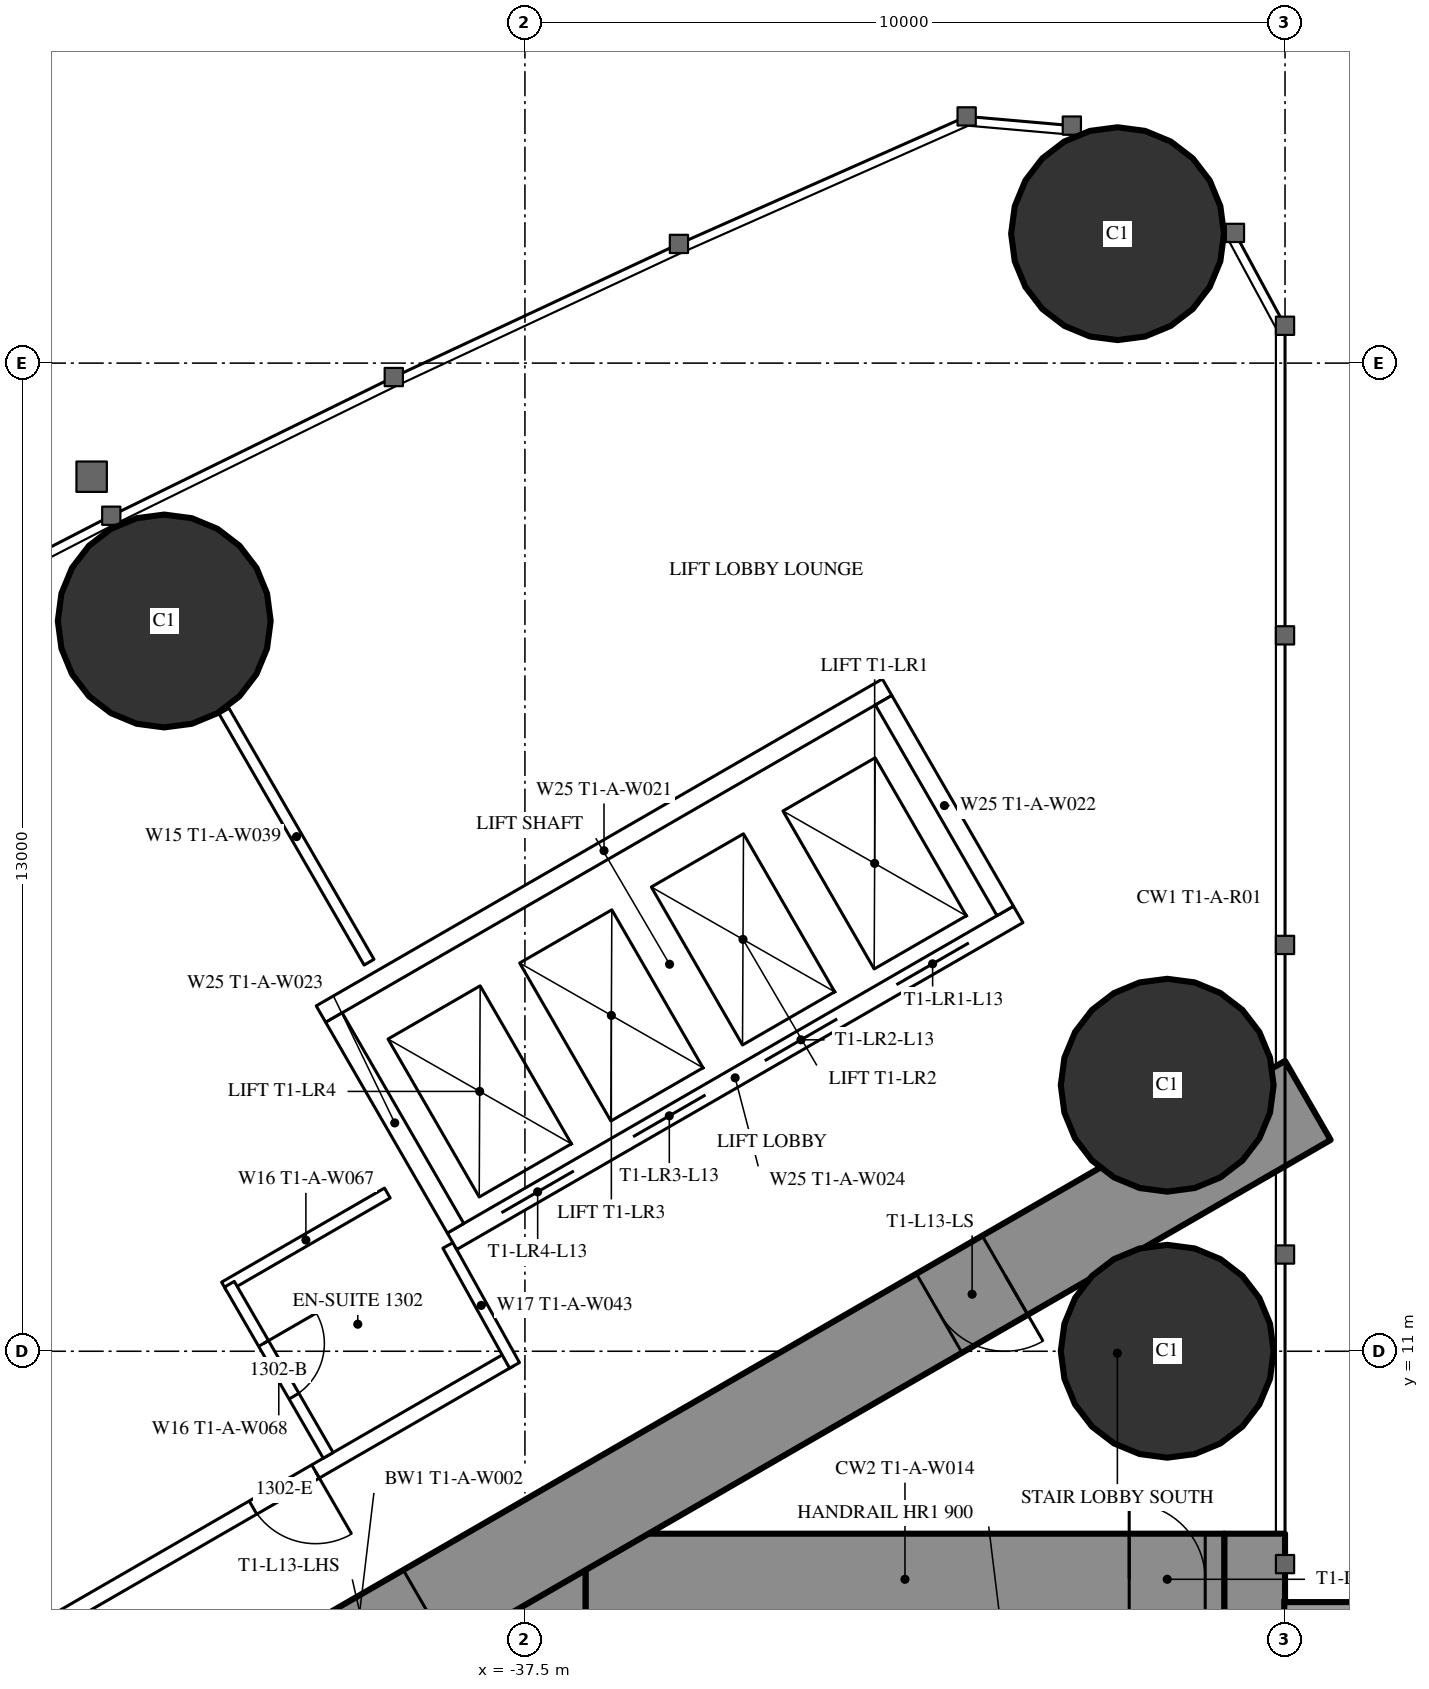
"""IFC4 building model, lengths in metres.
Left out: names, types, materials, properties, quantities, classifications, styles, units other than length and angle.
Written with IfcOpenShell. Run it as: python <this file> out.ifc"""

import sys

from ifc_helpers import new_model, si_unit, direction, frame, frame_2d, origin, origin_2d, place, context, subcontext, project, spatial, rectangle, hollow_circle, extrude, element, fill, save


model = new_model("IFC4")
c1 = context("Model", 3, precision=1e-05, world=origin(), true_north=direction((0.0, 1.0)))
c2 = subcontext(c1, "Body", "Model", "MODEL_VIEW")
j1 = project(units=[si_unit("LENGTHUNIT", "METRE"), si_unit("PLANEANGLEUNIT", "RADIAN")], contexts=[c1])
p1 = place(None, origin())
s1 = spatial("IfcSite", under=j1, at=p1, CompositionType="ELEMENT")
p2 = place(p1, origin())
s2 = spatial("IfcBuilding", under=s1, at=p2, CompositionType="ELEMENT")
p3 = place(p2, frame((0.0, 0.0, 53.0)))
s3 = spatial("IfcBuildingStorey", under=s2, at=p3, CompositionType="ELEMENT", Elevation=53.0)
for number, where, z_axis, x_axis in (
    (1, (-29.703, 25.703, 0.0), (0.0, 0.0, 1.0), (1.0, 0.0, 0.0)),
    (2, (-29.05, 11.0, 0.0), (0.0, 0.0, 1.0), (1.0, 0.0, 0.0)),
    (3, (-29.05, 14.5, 0.0), (0.0, 0.0, 1.0), (1.0, 0.0, 0.0)),
    (4, (-42.245, 20.607, 0.0), (0.0, 0.0, 1.0), (1.0, 0.0, 0.0)),
):
    element("IfcColumn", number, at=place(p3, frame(where, z_axis=z_axis, x_axis=x_axis)), inside=s3, PredefinedType="COLUMN", context=c2, shape_type="SweptSolid", body=[
        extrude(hollow_circle(Radius=1.4, WallThickness=0.12, at=origin_2d()), origin(), (0.0, 0.0, 1.0), 3.5),
    ])
p4 = place(p3, frame((-27.9, 8.6, 0.0), z_axis=(0.0, 0.0, 1.0), x_axis=(0.0, -1.0, 0.0)))
e5 = element("IfcWall", 5, at=p4, inside=s3, PredefinedType="SHEAR", context=c2, shape_type="SweptSolid", body=[
    extrude(rectangle(XDim=17.2, YDim=0.8, at=frame_2d((8.6, 0.0))), origin(), (0.0, 0.0, 1.0), 3.5),
])
p5 = place(p4, frame((2.45, 0.0, 0.6)))
e6 = element("IfcOpeningElement", 6, at=p5, cuts=e5, PredefinedType="OPENING", context=c2, shape_type="SweptSolid", body=[
    extrude(rectangle(XDim=0.6, YDim=2.1, at=frame_2d((0.3, 1.05))), frame((0.0, 0.41, 0.0), z_axis=(0.0, -1.0, 0.0), x_axis=(1.0, 0.0, 0.0)), (0.0, 0.0, 1.0), 0.82),
])
p6 = place(p4, frame((14.15, 0.0, 0.6)))
e7 = element("IfcOpeningElement", 7, at=p6, cuts=e5, PredefinedType="OPENING", context=c2, shape_type="SweptSolid", body=[
    extrude(rectangle(XDim=0.6, YDim=2.1, at=frame_2d((0.3, 1.05))), frame((0.0, 0.41, 0.0), z_axis=(0.0, -1.0, 0.0), x_axis=(1.0, 0.0, 0.0)), (0.0, 0.0, 1.0), 0.82),
])
p7 = place(p3, frame((-37.3, 8.6, 0.0), z_axis=(0.0, 0.0, 1.0), x_axis=(0.0, -1.0, 0.0)))
e8 = element("IfcWall", 8, at=p7, inside=s3, PredefinedType="SHEAR", context=c2, shape_type="SweptSolid", body=[
    extrude(rectangle(XDim=17.2, YDim=1.2, at=frame_2d((8.6, 0.0))), origin(), (0.0, 0.0, 1.0), 3.5),
])
p8 = place(p7, frame((7.7, 0.0, 0.0)))
e9 = element("IfcOpeningElement", 9, at=p8, cuts=e8, PredefinedType="OPENING", context=c2, shape_type="SweptSolid", body=[
    extrude(rectangle(XDim=1.8, YDim=2.2, at=frame_2d((0.9, 1.1))), frame((0.0, 0.61, 0.0), z_axis=(0.0, -1.0, 0.0), x_axis=(1.0, 0.0, 0.0)), (0.0, 0.0, 1.0), 1.22),
])
p9 = place(p3, frame((-28.3, 8.0, 0.0), z_axis=(0.0, 0.0, 1.0), x_axis=(-1.0, 0.0, 0.0)))
e10 = element("IfcWall", 10, at=p9, inside=s3, PredefinedType="SHEAR", context=c2, shape_type="SweptSolid", body=[
    extrude(rectangle(XDim=8.4, YDim=1.2, at=frame_2d((4.2, 0.0))), origin(), (0.0, 0.0, 1.0), 3.5),
])
p10 = place(p9, frame((0.25, 0.0, 0.0)))
e11 = element("IfcOpeningElement", 11, at=p10, cuts=e10, PredefinedType="OPENING", context=c2, shape_type="SweptSolid", body=[
    extrude(rectangle(XDim=1.0, YDim=2.2, at=frame_2d((0.5, 1.1))), frame((0.0, 0.61, 0.0), z_axis=(0.0, -1.0, 0.0), x_axis=(1.0, 0.0, 0.0)), (0.0, 0.0, 1.0), 1.22),
])
p11 = place(p3, frame((-27.2, 14.3, 0.0), z_axis=(0.0, 0.0, 1.0), x_axis=(-0.866026593062, -0.499997940104, 0.0)))
e12 = element("IfcWall", 12, at=p11, inside=s3, PredefinedType="SHEAR", context=c2, shape_type="SweptSolid", body=[
    extrude(rectangle(XDim=28.946, YDim=1.2, at=frame_2d((14.473, 0.0))), origin(), (0.0, 0.0, 1.0), 3.5),
])
p12 = place(p11, frame((4.6, 0.0, 0.0)))
e13 = element("IfcOpeningElement", 13, at=p12, cuts=e12, PredefinedType="OPENING", context=c2, shape_type="SweptSolid", body=[
    extrude(rectangle(XDim=1.0, YDim=2.2, at=frame_2d((0.5, 1.1))), frame((0.0, 0.61, 0.0), z_axis=(0.0, -1.0, 0.0), x_axis=(1.0, 0.0, 0.0)), (0.0, 0.0, 1.0), 1.22),
])
p13 = place(p11, frame((13.395, 0.0, 0.0)))
e14 = element("IfcOpeningElement", 14, at=p13, cuts=e12, PredefinedType="OPENING", context=c2, shape_type="SweptSolid", body=[
    extrude(rectangle(XDim=1.8, YDim=2.2, at=frame_2d((0.9, 1.1))), frame((0.0, 0.61, 0.0), z_axis=(0.0, -1.0, 0.0), x_axis=(1.0, 0.0, 0.0)), (0.0, 0.0, 1.0), 1.22),
])
p14 = place(p3, frame((-39.551, 16.119, 0.0), z_axis=(0.0, 0.0, 1.0), x_axis=(-0.500014214979, 0.866017196607, 0.0)))
e15 = element("IfcWall", 15, at=p14, inside=s3, PredefinedType="PARTITIONING", context=c2, shape_type="SweptSolid", body=[
    extrude(rectangle(XDim=3.815, YDim=0.15, at=frame_2d((1.907, 0.0))), origin(), (0.0, 0.0, 1.0), 3.25),
])
p15 = place(p3, frame((-37.7, 10.894, 0.0), z_axis=(0.0, 0.0, 1.0), x_axis=(-0.866027905338, -0.499995667157, 0.0)))
e16 = element("IfcWall", 16, at=p15, inside=s3, PredefinedType="PARTITIONING", context=c2, shape_type="SweptSolid", body=[
    extrude(rectangle(XDim=21.787, YDim=0.2, at=frame_2d((10.894, 0.0))), origin(), (0.0, 0.0, 1.0), 3.25),
])
p16 = place(p15, frame((20.237, 0.0, 0.0)))
e17 = element("IfcOpeningElement", 17, at=p16, cuts=e16, PredefinedType="OPENING", context=c2, shape_type="SweptSolid", body=[
    extrude(rectangle(XDim=0.95, YDim=2.2, at=frame_2d((0.475, 1.1))), frame((0.0, 0.11, 0.0), z_axis=(0.0, -1.0, 0.0), x_axis=(1.0, 0.0, 0.0)), (0.0, 0.0, 1.0), 0.22),
])
p17 = place(p15, frame((2.95, 0.0, 0.0)))
e18 = element("IfcOpeningElement", 18, at=p17, cuts=e16, PredefinedType="OPENING", context=c2, shape_type="SweptSolid", body=[
    extrude(rectangle(XDim=0.95, YDim=2.2, at=frame_2d((0.475, 1.1))), frame((0.0, 0.11, 0.0), z_axis=(0.0, -1.0, 0.0), x_axis=(1.0, 0.0, 0.0)), (0.0, 0.0, 1.0), 0.22),
])
p18 = place(p3, frame((-38.513, 12.392, 0.0), z_axis=(0.0, 0.0, 1.0), x_axis=(0.485585508183, -0.874189175317, 0.0)))
e19 = element("IfcWall", 19, at=p18, inside=s3, PredefinedType="PARTITIONING", context=c2, shape_type="SweptSolid", body=[
    extrude(rectangle(XDim=1.805, YDim=0.15, at=frame_2d((0.902, 0.0))), origin(), (0.0, 0.0, 1.0), 3.25),
])
p19 = place(p3, frame((-39.31, 13.082, 0.0), z_axis=(0.0, 0.0, 1.0), x_axis=(-0.866031185235, -0.4999899861, 0.0)))
e20 = element("IfcWall", 20, at=p19, inside=s3, PredefinedType="PARTITIONING", context=c2, shape_type="SweptSolid", body=[
    extrude(rectangle(XDim=2.475, YDim=0.15, at=frame_2d((1.238, 0.0))), origin(), (0.0, 0.0, 1.0), 3.25),
])
p20 = place(p3, frame((-40.088, 9.63, 0.0), z_axis=(0.0, 0.0, 1.0), x_axis=(-0.500006934395, 0.866021400173, 0.0)))
e21 = element("IfcWall", 21, at=p20, inside=s3, PredefinedType="PARTITIONING", context=c2, shape_type="SweptSolid", body=[
    extrude(rectangle(XDim=2.6, YDim=0.15, at=frame_2d((1.3, 0.0))), origin(), (0.0, 0.0, 1.0), 3.25),
])
p21 = place(p20, frame((0.9, 0.0, 0.0)))
e22 = element("IfcOpeningElement", 22, at=p21, cuts=e21, PredefinedType="OPENING", context=c2, shape_type="SweptSolid", body=[
    extrude(rectangle(XDim=0.8, YDim=2.2, at=frame_2d((0.4, 1.1))), frame((0.0, 0.085, 0.0), z_axis=(0.0, -1.0, 0.0), x_axis=(1.0, 0.0, 0.0)), (0.0, 0.0, 1.0), 0.17),
])
p22 = place(p3, frame((-31.01, 16.747, 0.0), z_axis=(0.0, 0.0, 1.0), x_axis=(-0.866028165386, -0.499995216735, 0.0)))
e23 = element("IfcWall", 23, at=p22, inside=s3, PredefinedType="PARTITIONING", context=c2, shape_type="SweptSolid", body=[
    extrude(rectangle(XDim=8.6, YDim=0.25, at=frame_2d((4.3, 0.0))), origin(), (0.0, 0.0, 1.0), 3.25),
])
p23 = place(p22, frame((0.75, 0.0, 0.0)))
e24 = element("IfcOpeningElement", 24, at=p23, cuts=e23, PredefinedType="OPENING", context=c2, shape_type="SweptSolid", body=[
    extrude(rectangle(XDim=1.1, YDim=2.2, at=frame_2d((0.55, 1.1))), frame((0.0, 0.135, 0.0), z_axis=(0.0, -1.0, 0.0), x_axis=(1.0, 0.0, 0.0)), (0.0, 0.0, 1.0), 0.27),
])
p24 = place(p22, frame((2.75, 0.0, 0.0)))
e25 = element("IfcOpeningElement", 25, at=p24, cuts=e23, PredefinedType="OPENING", context=c2, shape_type="SweptSolid", body=[
    extrude(rectangle(XDim=1.1, YDim=2.2, at=frame_2d((0.55, 1.1))), frame((0.0, 0.135, 0.0), z_axis=(0.0, -1.0, 0.0), x_axis=(1.0, 0.0, 0.0)), (0.0, 0.0, 1.0), 0.27),
])
p25 = place(p22, frame((4.75, 0.0, 0.0)))
e26 = element("IfcOpeningElement", 26, at=p25, cuts=e23, PredefinedType="OPENING", context=c2, shape_type="SweptSolid", body=[
    extrude(rectangle(XDim=1.1, YDim=2.2, at=frame_2d((0.55, 1.1))), frame((0.0, 0.135, 0.0), z_axis=(0.0, -1.0, 0.0), x_axis=(1.0, 0.0, 0.0)), (0.0, 0.0, 1.0), 0.27),
])
p26 = place(p22, frame((6.75, 0.0, 0.0)))
e27 = element("IfcOpeningElement", 27, at=p26, cuts=e23, PredefinedType="OPENING", context=c2, shape_type="SweptSolid", body=[
    extrude(rectangle(XDim=1.1, YDim=2.2, at=frame_2d((0.55, 1.1))), frame((0.0, 0.135, 0.0), z_axis=(0.0, -1.0, 0.0), x_axis=(1.0, 0.0, 0.0)), (0.0, 0.0, 1.0), 0.27),
])
p27 = place(p3, frame((-32.736, 19.736, 0.0), z_axis=(0.0, 0.0, 1.0), x_axis=(-0.866028165386, -0.499995216735, 0.0)))
e28 = element("IfcWall", 28, at=p27, inside=s3, PredefinedType="PARTITIONING", context=c2, shape_type="SweptSolid", body=[
    extrude(rectangle(XDim=8.6, YDim=0.25, at=frame_2d((4.3, 0.0))), origin(), (0.0, 0.0, 1.0), 3.25),
])
p28 = place(p3, frame((-31.181, 16.793, 0.0), z_axis=(0.0, 0.0, 1.0), x_axis=(-0.499929347863, 0.866066190972, 0.0)))
e29 = element("IfcWall", 29, at=p28, inside=s3, PredefinedType="PARTITIONING", context=c2, shape_type="SweptSolid", body=[
    extrude(rectangle(XDim=3.201, YDim=0.25, at=frame_2d((1.6, 0.0))), origin(), (0.0, 0.0, 1.0), 3.25),
])
p29 = place(p3, frame((-38.413, 12.618, 0.0), z_axis=(0.0, 0.0, 1.0), x_axis=(-0.499872130319, 0.866099216793, 0.0)))
e30 = element("IfcWall", 30, at=p29, inside=s3, PredefinedType="PARTITIONING", context=c2, shape_type="SweptSolid", body=[
    extrude(rectangle(XDim=3.2, YDim=0.25, at=frame_2d((1.6, 0.0))), origin(), (0.0, 0.0, 1.0), 3.25),
])
p30 = place(p21, origin())
e31 = element("IfcDoor", 31, at=p30, inside=s3, OperationType="SINGLE_SWING_RIGHT", PredefinedType="DOOR", context=c2, shape_type="SweptSolid", body=[
    extrude(rectangle(XDim=0.8, YDim=2.2, at=frame_2d((0.4, 1.1))), frame((0.0, 0.025, 0.0), z_axis=(0.0, -1.0, 0.0), x_axis=(1.0, 0.0, 0.0)), (0.0, 0.0, 1.0), 0.05),
])
fill(e22, e31)
p31 = place(p17, origin())
e32 = element("IfcDoor", 32, at=p31, inside=s3, OperationType="SINGLE_SWING_LEFT", PredefinedType="DOOR", context=c2, shape_type="SweptSolid", body=[
    extrude(rectangle(XDim=0.95, YDim=2.2, at=frame_2d((0.475, 1.1))), frame((0.0, 0.025, 0.0), z_axis=(0.0, -1.0, 0.0), x_axis=(1.0, 0.0, 0.0)), (0.0, 0.0, 1.0), 0.05),
])
fill(e18, e32)
p32 = place(p12, origin())
e33 = element("IfcDoor", 33, at=p32, inside=s3, OperationType="SINGLE_SWING_LEFT", PredefinedType="DOOR", context=c2, shape_type="SweptSolid", body=[
    extrude(rectangle(XDim=1.0, YDim=2.2, at=frame_2d((0.5, 1.1))), frame((0.0, 0.025, 0.0), z_axis=(0.0, -1.0, 0.0), x_axis=(1.0, 0.0, 0.0)), (0.0, 0.0, 1.0), 0.05),
])
fill(e13, e33)
p33 = place(p13, origin())
e34 = element("IfcDoor", 34, at=p33, inside=s3, OperationType="DOUBLE_DOOR_SINGLE_SWING", PredefinedType="DOOR", context=c2, shape_type="SweptSolid", body=[
    extrude(rectangle(XDim=1.8, YDim=2.2, at=frame_2d((0.9, 1.1))), frame((0.0, 0.025, 0.0), z_axis=(0.0, -1.0, 0.0), x_axis=(1.0, 0.0, 0.0)), (0.0, 0.0, 1.0), 0.05),
])
fill(e14, e34)
p34 = place(p10, origin())
e35 = element("IfcDoor", 35, at=p34, inside=s3, OperationType="SINGLE_SWING_RIGHT", PredefinedType="DOOR", context=c2, shape_type="SweptSolid", body=[
    extrude(rectangle(XDim=1.0, YDim=2.2, at=frame_2d((0.5, 1.1))), frame((0.0, 0.025, 0.0), z_axis=(0.0, -1.0, 0.0), x_axis=(1.0, 0.0, 0.0)), (0.0, 0.0, 1.0), 0.05),
])
fill(e11, e35)
p35 = place(p23, origin())
e36 = element("IfcDoor", 36, at=p35, inside=s3, OperationType="DOUBLE_DOOR_SLIDING", PredefinedType="USERDEFINED", context=c2, shape_type="SweptSolid", body=[
    extrude(rectangle(XDim=1.1, YDim=2.2, at=frame_2d((0.55, 1.1))), frame((0.0, 0.025, 0.0), z_axis=(0.0, -1.0, 0.0), x_axis=(1.0, 0.0, 0.0)), (0.0, 0.0, 1.0), 0.05),
])
fill(e24, e36)
p36 = place(p24, origin())
e37 = element("IfcDoor", 37, at=p36, inside=s3, OperationType="DOUBLE_DOOR_SLIDING", PredefinedType="USERDEFINED", context=c2, shape_type="SweptSolid", body=[
    extrude(rectangle(XDim=1.1, YDim=2.2, at=frame_2d((0.55, 1.1))), frame((0.0, 0.025, 0.0), z_axis=(0.0, -1.0, 0.0), x_axis=(1.0, 0.0, 0.0)), (0.0, 0.0, 1.0), 0.05),
])
fill(e25, e37)
p37 = place(p25, origin())
e38 = element("IfcDoor", 38, at=p37, inside=s3, OperationType="DOUBLE_DOOR_SLIDING", PredefinedType="USERDEFINED", context=c2, shape_type="SweptSolid", body=[
    extrude(rectangle(XDim=1.1, YDim=2.2, at=frame_2d((0.55, 1.1))), frame((0.0, 0.025, 0.0), z_axis=(0.0, -1.0, 0.0), x_axis=(1.0, 0.0, 0.0)), (0.0, 0.0, 1.0), 0.05),
])
fill(e26, e38)
p38 = place(p26, origin())
e39 = element("IfcDoor", 39, at=p38, inside=s3, OperationType="DOUBLE_DOOR_SLIDING", PredefinedType="USERDEFINED", context=c2, shape_type="SweptSolid", body=[
    extrude(rectangle(XDim=1.1, YDim=2.2, at=frame_2d((0.55, 1.1))), frame((0.0, 0.025, 0.0), z_axis=(0.0, -1.0, 0.0), x_axis=(1.0, 0.0, 0.0)), (0.0, 0.0, 1.0), 0.05),
])
fill(e27, e39)
save(model, sys.argv[1])
